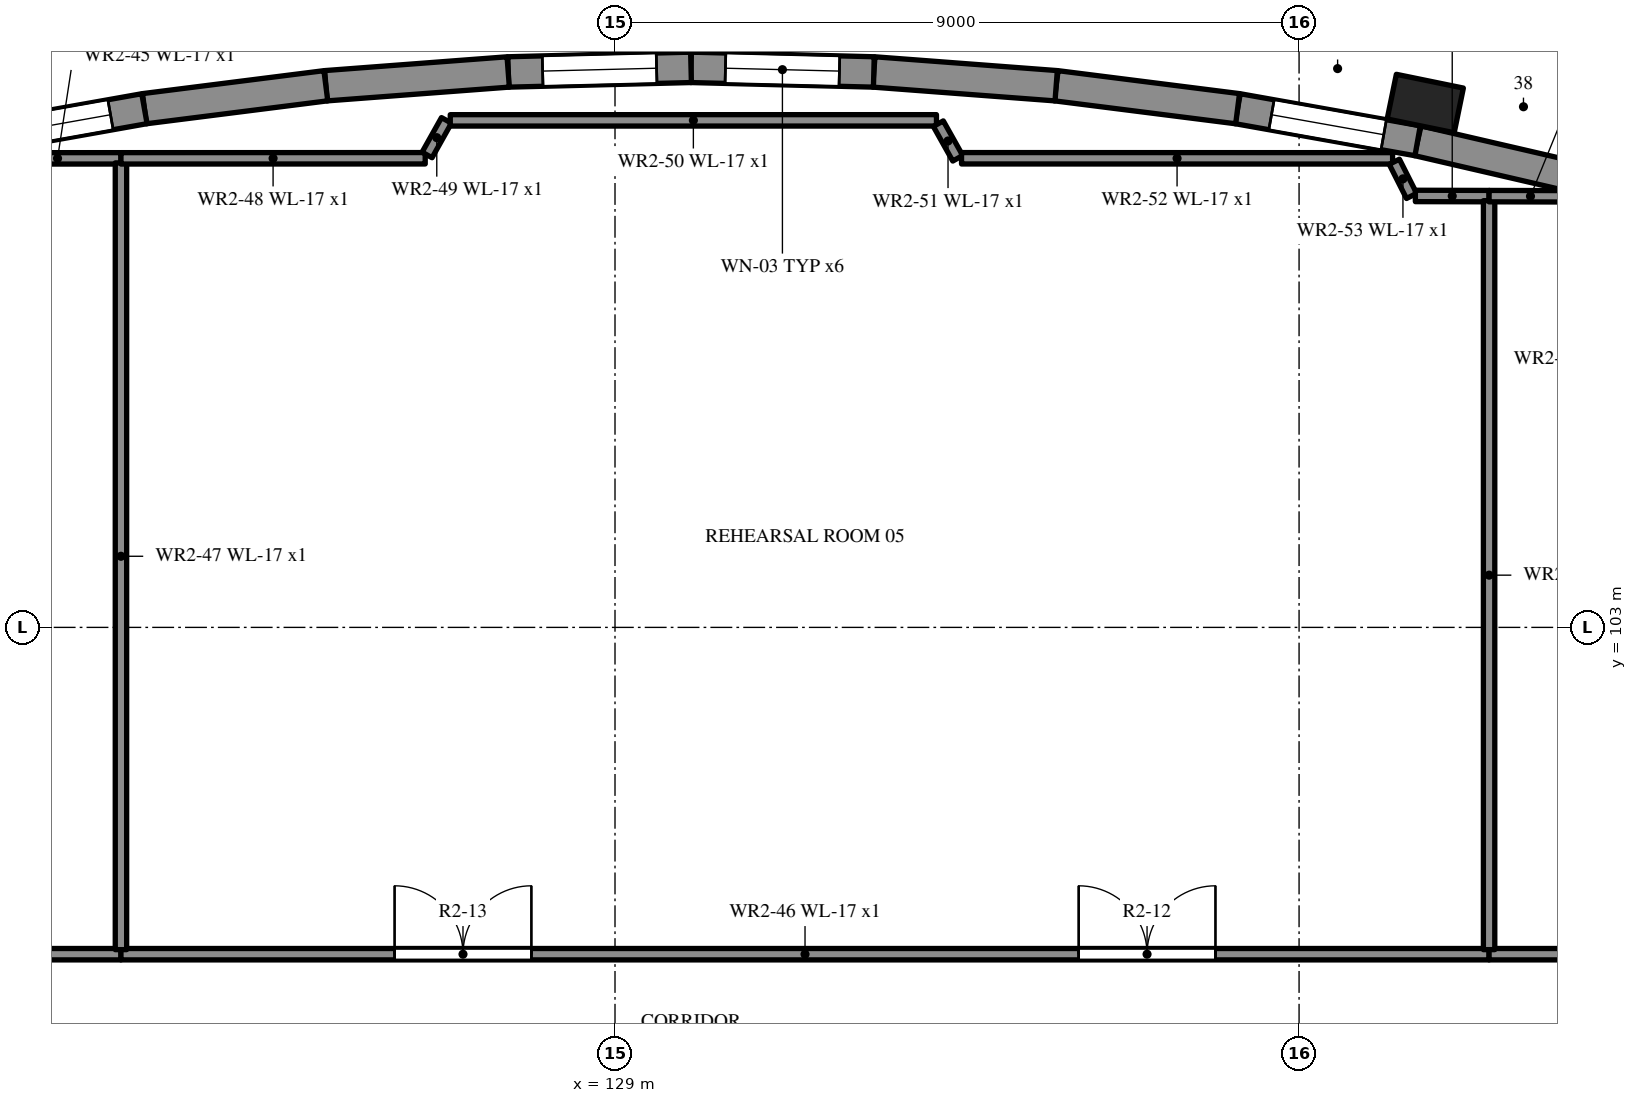
"""IFC4 building model, lengths in metres.
Left out: names, types, materials, properties, quantities, classifications, styles, units other than length and angle.
Written with IfcOpenShell. Run it as: python <this file> out.ifc"""

import sys

from ifc_helpers import new_model, si_unit, direction, frame, frame_2d, origin, origin_2d, place, context, subcontext, project, spatial, polyline, rectangle, outline, extrude, element, fill, save


model = new_model("IFC4")
c1 = context("Model", 3, precision=1e-05, world=origin(), true_north=direction((0.0, 1.0)))
c2 = subcontext(c1, "Body", "Model", "MODEL_VIEW")
j1 = project(units=[si_unit("LENGTHUNIT", "METRE"), si_unit("PLANEANGLEUNIT", "RADIAN")], contexts=[c1])
p1 = place(None, origin())
s1 = spatial("IfcSite", under=j1, at=p1, CompositionType="ELEMENT")
p2 = place(p1, origin())
s2 = spatial("IfcBuilding", under=s1, at=p2, CompositionType="ELEMENT")
p3 = place(p2, frame((0.0, 0.0, 10.2)))
s3 = spatial("IfcBuildingStorey", under=s2, at=p3, CompositionType="ELEMENT", Elevation=10.2)
p4 = place(p3, frame((142.006, 108.836, 0.0), z_axis=(0.0, 0.0, 1.0), x_axis=(-0.974189274843, 0.225732710925, 0.0)))
e1 = element("IfcWall", 1, at=p4, inside=s3, PredefinedType="SOLIDWALL", context=c2, shape_type="SweptSolid", body=[
    extrude(outline(polyline([(0.0, 0.0), (2.511, 0.0), (2.511, 3.813), (2.472, 3.799), (2.379, 3.766), (0.0, 2.911), (0.0, 0.0)])), frame((0.0, 0.2, 0.0), z_axis=(0.0, -1.0, 0.0), x_axis=(1.0, 0.0, 0.0)), (0.0, 0.0, 1.0), 0.4),
])
p5 = place(p3, frame((139.56, 109.403, 0.0), z_axis=(0.0, 0.0, 1.0), x_axis=(-0.984524011381, 0.175249738987, 0.0)))
e2 = element("IfcWall", 2, at=p5, inside=s3, PredefinedType="SOLIDWALL", context=c2, shape_type="SweptSolid", body=[
    extrude(outline(polyline([(0.0, 0.0), (2.406, 0.0), (2.406, 2.959), (2.328, 2.988), (0.085, 3.827), (0.0, 3.817), (0.0, 0.0)])), frame((0.0, 0.2, 0.0), z_axis=(0.0, -1.0, 0.0), x_axis=(1.0, 0.0, 0.0)), (0.0, 0.0, 1.0), 0.4),
])
p6 = place(p5, frame((0.453, 0.0, 0.9)))
e3 = element("IfcOpeningElement", 3, at=p6, cuts=e2, PredefinedType="OPENING", context=c2, shape_type="SweptSolid", body=[
    extrude(rectangle(XDim=1.5, YDim=1.2, at=frame_2d((0.75, 0.6))), frame((0.0, 0.21, 0.0), z_axis=(0.0, -1.0, 0.0), x_axis=(1.0, 0.0, 0.0)), (0.0, 0.0, 1.0), 0.42),
])
p7 = place(p3, frame((137.191, 109.825, 0.0), z_axis=(0.0, 0.0, 1.0), x_axis=(-0.99208939311, 0.125533406227, 0.0)))
e4 = element("IfcWall", 4, at=p7, inside=s3, PredefinedType="SOLIDWALL", context=c2, shape_type="SweptSolid", body=[
    extrude(outline(polyline([(0.0, 0.0), (2.406, 0.0), (2.406, 2.056), (2.298, 2.096), (0.066, 2.931), (0.0, 2.955), (0.0, 0.0)])), frame((0.0, 0.2, 0.0), z_axis=(0.0, -1.0, 0.0), x_axis=(1.0, 0.0, 0.0)), (0.0, 0.0, 1.0), 0.4),
])
p8 = place(p3, frame((134.804, 110.127, 0.0), z_axis=(0.0, 0.0, 1.0), x_axis=(-0.997153910364, 0.075392831525, 0.0)))
e5 = element("IfcWall", 5, at=p8, inside=s3, PredefinedType="SOLIDWALL", context=c2, shape_type="SweptSolid", body=[
    extrude(outline(polyline([(0.0, 0.0), (2.406, 0.0), (2.406, 2.955), (2.383, 2.947), (0.061, 2.077), (0.0, 2.054), (0.0, 0.0)])), frame((0.0, 0.2, 0.0), z_axis=(0.0, -1.0, 0.0), x_axis=(1.0, 0.0, 0.0)), (0.0, 0.0, 1.0), 0.4),
])
p9 = place(p3, frame((132.405, 110.308, 0.0), z_axis=(0.0, 0.0, 1.0), x_axis=(-0.999683321759, 0.025164582196, 0.0)))
e6 = element("IfcWall", 6, at=p9, inside=s3, PredefinedType="SOLIDWALL", context=c2, shape_type="SweptSolid", body=[
    extrude(outline(polyline([(0.0, 0.0), (2.406, 0.0), (2.406, 3.859), (2.333, 3.831), (0.0, 2.959), (0.0, 0.0)])), frame((0.0, 0.2, 0.0), z_axis=(0.0, -1.0, 0.0), x_axis=(1.0, 0.0, 0.0)), (0.0, 0.0, 1.0), 0.4),
])
p10 = place(p9, frame((0.453, 0.0, 0.9)))
e7 = element("IfcOpeningElement", 7, at=p10, cuts=e6, PredefinedType="OPENING", context=c2, shape_type="SweptSolid", body=[
    extrude(rectangle(XDim=1.5, YDim=1.2, at=frame_2d((0.75, 0.6))), frame((0.0, 0.21, 0.0), z_axis=(0.0, -1.0, 0.0), x_axis=(1.0, 0.0, 0.0)), (0.0, 0.0, 1.0), 0.42),
])
p11 = place(p3, frame((130.0, 110.369, 0.0), z_axis=(0.0, 0.0, 1.0), x_axis=(-0.999683321759, -0.025164582196, 0.0)))
e8 = element("IfcWall", 8, at=p11, inside=s3, PredefinedType="SOLIDWALL", context=c2, shape_type="SweptSolid", body=[
    extrude(outline(polyline([(0.0, 0.0), (2.406, 0.0), (2.406, 2.959), (2.373, 2.971), (0.063, 3.835), (0.0, 3.859), (0.0, 0.0)])), frame((0.0, 0.2, 0.0), z_axis=(0.0, -1.0, 0.0), x_axis=(1.0, 0.0, 0.0)), (0.0, 0.0, 1.0), 0.4),
])
p12 = place(p11, frame((0.453, 0.0, 0.9)))
e9 = element("IfcOpeningElement", 9, at=p12, cuts=e8, PredefinedType="OPENING", context=c2, shape_type="SweptSolid", body=[
    extrude(rectangle(XDim=1.5, YDim=1.2, at=frame_2d((0.75, 0.6))), frame((0.0, 0.21, 0.0), z_axis=(0.0, -1.0, 0.0), x_axis=(1.0, 0.0, 0.0)), (0.0, 0.0, 1.0), 0.42),
])
p13 = place(p3, frame((127.595, 110.308, 0.0), z_axis=(0.0, 0.0, 1.0), x_axis=(-0.997153910364, -0.075392831525, 0.0)))
e10 = element("IfcWall", 10, at=p13, inside=s3, PredefinedType="SOLIDWALL", context=c2, shape_type="SweptSolid", body=[
    extrude(outline(polyline([(0.0, 0.0), (2.406, 0.0), (2.406, 2.067), (2.396, 2.063), (2.345, 2.077), (0.0, 2.955), (0.0, 0.0)])), frame((0.0, 0.2, 0.0), z_axis=(0.0, -1.0, 0.0), x_axis=(1.0, 0.0, 0.0)), (0.0, 0.0, 1.0), 0.4),
])
p14 = place(p3, frame((125.196, 110.127, 0.0), z_axis=(0.0, 0.0, 1.0), x_axis=(-0.99208939311, -0.125533406227, 0.0)))
e11 = element("IfcWall", 11, at=p14, inside=s3, PredefinedType="SOLIDWALL", context=c2, shape_type="SweptSolid", body=[
    extrude(outline(polyline([(0.0, 0.0), (2.406, 0.0), (2.406, 2.969), (2.34, 2.946), (0.108, 2.111), (0.0, 2.07), (0.0, 0.0)])), frame((0.0, 0.2, 0.0), z_axis=(0.0, -1.0, 0.0), x_axis=(1.0, 0.0, 0.0)), (0.0, 0.0, 1.0), 0.4),
])
p15 = place(p3, frame((122.809, 109.825, 0.0), z_axis=(0.0, 0.0, 1.0), x_axis=(-0.984524011381, -0.175249738987, 0.0)))
e12 = element("IfcWall", 12, at=p15, inside=s3, PredefinedType="SOLIDWALL", context=c2, shape_type="SweptSolid", body=[
    extrude(outline(polyline([(0.0, 0.0), (2.406, 0.0), (2.406, 3.833), (2.357, 3.855), (2.285, 3.828), (0.078, 3.002), (0.0, 2.973), (0.0, 0.0)])), frame((0.0, 0.2, 0.0), z_axis=(0.0, -1.0, 0.0), x_axis=(1.0, 0.0, 0.0)), (0.0, 0.0, 1.0), 0.4),
])
p16 = place(p15, frame((0.453, 0.0, 0.9)))
e13 = element("IfcOpeningElement", 13, at=p16, cuts=e12, PredefinedType="OPENING", context=c2, shape_type="SweptSolid", body=[
    extrude(rectangle(XDim=1.5, YDim=1.2, at=frame_2d((0.75, 0.6))), frame((0.0, 0.21, 0.0), z_axis=(0.0, -1.0, 0.0), x_axis=(1.0, 0.0, 0.0)), (0.0, 0.0, 1.0), 0.42),
])
p17 = place(p3, frame((130.0, 110.869, 0.0), z_axis=(0.0, 0.0, 1.0), x_axis=(-1.0, 0.0, 0.0)))
e14 = element("IfcColumn", 14, at=p17, inside=s3, PredefinedType="PILASTER", context=c2, shape_type="SweptSolid", body=[
    extrude(rectangle(XDim=0.9, YDim=0.6, at=origin_2d()), origin(), (0.0, 0.0, 1.0), 3.381),
])
p18 = place(p3, frame((139.66, 109.893, 0.0), z_axis=(0.0, 0.0, 1.0), x_axis=(-0.979575047818, 0.201078904144, 0.0)))
e15 = element("IfcColumn", 15, at=p18, inside=s3, PredefinedType="PILASTER", context=c2, shape_type="SweptSolid", body=[
    extrude(rectangle(XDim=0.9, YDim=0.6, at=origin_2d()), origin(), (0.0, 0.0, 1.0), 3.247),
])
p19 = place(p3, frame((117.33, 98.7, 0.0), z_axis=(0.0, 0.0, 1.0), x_axis=(1.0, 0.0, 0.0)))
e16 = element("IfcWall", 16, at=p19, inside=s3, PredefinedType="PARTITIONING", context=c2, shape_type="SweptSolid", body=[
    extrude(rectangle(XDim=5.17, YDim=0.15, at=frame_2d((2.585, 0.0))), origin(), (0.0, 0.0, 1.0), 2.5),
])
p20 = place(p19, frame((2.07, 0.0, 0.0)))
e17 = element("IfcOpeningElement", 17, at=p20, cuts=e16, PredefinedType="OPENING", context=c2, shape_type="SweptSolid", body=[
    extrude(rectangle(XDim=1.0, YDim=2.1, at=frame_2d((0.5, 1.05))), frame((0.0, 0.085, 0.0), z_axis=(0.0, -1.0, 0.0), x_axis=(1.0, 0.0, 0.0)), (0.0, 0.0, 1.0), 0.17),
])
p21 = place(p3, frame((120.831, 109.171, 0.0), z_axis=(0.0, 0.0, 1.0), x_axis=(0.999999957189, 0.000292611546, 0.0)))
e18 = element("IfcWall", 18, at=p21, inside=s3, PredefinedType="PARTITIONING", context=c2, shape_type="SweptSolid", body=[
    extrude(rectangle(XDim=1.669, YDim=0.15, at=frame_2d((0.834, 0.0))), origin(), (0.0, 0.0, 1.0), 2.5),
])
p22 = place(p3, frame((122.5, 98.7, 0.0), z_axis=(0.0, 0.0, 1.0), x_axis=(1.0, 0.0, 0.0)))
e19 = element("IfcWall", 19, at=p22, inside=s3, PredefinedType="PARTITIONING", context=c2, shape_type="SweptSolid", body=[
    extrude(rectangle(XDim=18.0, YDim=0.15, at=frame_2d((9.0, 0.0))), origin(), (0.0, 0.0, 1.0), 2.5),
])
p23 = place(p22, frame((12.6, 0.0, 0.0)))
e20 = element("IfcOpeningElement", 20, at=p23, cuts=e19, PredefinedType="OPENING", context=c2, shape_type="SweptSolid", body=[
    extrude(rectangle(XDim=1.8, YDim=2.1, at=frame_2d((0.9, 1.05))), frame((0.0, 0.085, 0.0), z_axis=(0.0, -1.0, 0.0), x_axis=(1.0, 0.0, 0.0)), (0.0, 0.0, 1.0), 0.17),
])
p24 = place(p22, frame((3.6, 0.0, 0.0)))
e21 = element("IfcOpeningElement", 21, at=p24, cuts=e19, PredefinedType="OPENING", context=c2, shape_type="SweptSolid", body=[
    extrude(rectangle(XDim=1.8, YDim=2.1, at=frame_2d((0.9, 1.05))), frame((0.0, 0.085, 0.0), z_axis=(0.0, -1.0, 0.0), x_axis=(1.0, 0.0, 0.0)), (0.0, 0.0, 1.0), 0.17),
])
p25 = place(p3, frame((122.5, 109.112, 0.0), z_axis=(0.0, 0.0, 1.0), x_axis=(0.0, -1.0, 0.0)))
e22 = element("IfcWall", 22, at=p25, inside=s3, PredefinedType="PARTITIONING", context=c2, shape_type="SweptSolid", body=[
    extrude(rectangle(XDim=10.352, YDim=0.15, at=frame_2d((5.176, 0.0))), origin(), (0.0, 0.0, 1.0), 2.5),
])
p26 = place(p3, frame((122.5, 109.172, 0.0), z_axis=(0.0, 0.0, 1.0), x_axis=(0.999999970241, 0.000243961935, 0.0)))
e23 = element("IfcWall", 23, at=p26, inside=s3, PredefinedType="PARTITIONING", context=c2, shape_type="SweptSolid", body=[
    extrude(rectangle(XDim=4.003, YDim=0.15, at=frame_2d((2.001, 0.0))), origin(), (0.0, 0.0, 1.0), 2.5),
])
p27 = place(p3, frame((126.528, 109.216, 0.0), z_axis=(0.0, 0.0, 1.0), x_axis=(0.489016553908, 0.872274503814, 0.0)))
e24 = element("IfcWall", 24, at=p27, inside=s3, PredefinedType="PARTITIONING", context=c2, shape_type="SweptSolid", body=[
    extrude(rectangle(XDim=0.522, YDim=0.15, at=frame_2d((0.261, 0.0))), origin(), (0.0, 0.0, 1.0), 2.5),
])
p28 = place(p3, frame((126.833, 109.671, 0.0), z_axis=(0.0, 0.0, 1.0), x_axis=(0.999999999272, 3.8165026e-05, 0.0)))
e25 = element("IfcWall", 25, at=p28, inside=s3, PredefinedType="PARTITIONING", context=c2, shape_type="SweptSolid", body=[
    extrude(rectangle(XDim=6.397, YDim=0.15, at=frame_2d((3.198, 0.0))), origin(), (0.0, 0.0, 1.0), 2.5),
])
p29 = place(p3, frame((133.254, 109.628, 0.0), z_axis=(0.0, 0.0, 1.0), x_axis=(0.489016553908, -0.872274503814, 0.0)))
e26 = element("IfcWall", 26, at=p29, inside=s3, PredefinedType="PARTITIONING", context=c2, shape_type="SweptSolid", body=[
    extrude(rectangle(XDim=0.522, YDim=0.15, at=frame_2d((0.261, 0.0))), origin(), (0.0, 0.0, 1.0), 2.5),
])
p30 = place(p3, frame((133.559, 109.173, 0.0), z_axis=(0.0, 0.0, 1.0), x_axis=(0.999999976836, -0.00021523891, 0.0)))
e27 = element("IfcWall", 27, at=p30, inside=s3, PredefinedType="PARTITIONING", context=c2, shape_type="SweptSolid", body=[
    extrude(rectangle(XDim=5.671, YDim=0.15, at=frame_2d((2.836, 0.0))), origin(), (0.0, 0.0, 1.0), 2.5),
])
p31 = place(p3, frame((139.253, 109.127, 0.0), z_axis=(0.0, 0.0, 1.0), x_axis=(0.450699478725, -0.892675741732, 0.0)))
e28 = element("IfcWall", 28, at=p31, inside=s3, PredefinedType="PARTITIONING", context=c2, shape_type="SweptSolid", body=[
    extrude(rectangle(XDim=0.504, YDim=0.15, at=frame_2d((0.252, 0.0))), origin(), (0.0, 0.0, 1.0), 2.5),
])
p32 = place(p3, frame((139.53, 108.677, 0.0), z_axis=(0.0, 0.0, 1.0), x_axis=(0.999996832397, -0.002516981708, 0.0)))
e29 = element("IfcWall", 29, at=p32, inside=s3, PredefinedType="PARTITIONING", context=c2, shape_type="SweptSolid", body=[
    extrude(rectangle(XDim=0.97, YDim=0.15, at=frame_2d((0.485, 0.0))), origin(), (0.0, 0.0, 1.0), 2.5),
])
p33 = place(p3, frame((140.5, 98.7, 0.0), z_axis=(0.0, 0.0, 1.0), x_axis=(1.0, 0.0, 0.0)))
e30 = element("IfcWall", 30, at=p33, inside=s3, PredefinedType="PARTITIONING", context=c2, shape_type="SweptSolid", body=[
    extrude(rectangle(XDim=9.57, YDim=0.15, at=frame_2d((4.785, 0.0))), origin(), (0.0, 0.0, 1.0), 2.5),
])
p34 = place(p33, frame((4.3, 0.0, 0.0)))
e31 = element("IfcOpeningElement", 31, at=p34, cuts=e30, PredefinedType="OPENING", context=c2, shape_type="SweptSolid", body=[
    extrude(rectangle(XDim=1.0, YDim=2.1, at=frame_2d((0.5, 1.05))), frame((0.0, 0.085, 0.0), z_axis=(0.0, -1.0, 0.0), x_axis=(1.0, 0.0, 0.0)), (0.0, 0.0, 1.0), 0.17),
])
p35 = place(p3, frame((140.5, 108.615, 0.0), z_axis=(0.0, 0.0, 1.0), x_axis=(0.0, -1.0, 0.0)))
e32 = element("IfcWall", 32, at=p35, inside=s3, PredefinedType="PARTITIONING", context=c2, shape_type="SweptSolid", body=[
    extrude(rectangle(XDim=9.854, YDim=0.15, at=frame_2d((4.927, 0.0))), origin(), (0.0, 0.0, 1.0), 2.5),
])
p36 = place(p3, frame((140.5, 108.674, 0.0), z_axis=(0.0, 0.0, 1.0), x_axis=(0.999996961255, -0.002465254723, 0.0)))
e33 = element("IfcWall", 33, at=p36, inside=s3, PredefinedType="PARTITIONING", context=c2, shape_type="SweptSolid", body=[
    extrude(rectangle(XDim=1.089, YDim=0.15, at=frame_2d((0.545, 0.0))), origin(), (0.0, 0.0, 1.0), 2.5),
])
p37 = place(p6, origin())
e34 = element("IfcWindow", 34, at=p37, inside=s3, PartitioningType="SINGLE_PANEL", PredefinedType="WINDOW", context=c2, shape_type="SweptSolid", body=[
    extrude(rectangle(XDim=1.5, YDim=1.2, at=frame_2d((0.75, 0.6))), frame((0.0, 0.03, 0.0), z_axis=(0.0, -1.0, 0.0), x_axis=(1.0, 0.0, 0.0)), (0.0, 0.0, 1.0), 0.06),
])
fill(e3, e34)
p38 = place(p10, origin())
e35 = element("IfcWindow", 35, at=p38, inside=s3, PartitioningType="SINGLE_PANEL", PredefinedType="WINDOW", context=c2, shape_type="SweptSolid", body=[
    extrude(rectangle(XDim=1.5, YDim=1.2, at=frame_2d((0.75, 0.6))), frame((0.0, 0.03, 0.0), z_axis=(0.0, -1.0, 0.0), x_axis=(1.0, 0.0, 0.0)), (0.0, 0.0, 1.0), 0.06),
])
fill(e7, e35)
p39 = place(p12, origin())
e36 = element("IfcWindow", 36, at=p39, inside=s3, PartitioningType="SINGLE_PANEL", PredefinedType="WINDOW", context=c2, shape_type="SweptSolid", body=[
    extrude(rectangle(XDim=1.5, YDim=1.2, at=frame_2d((0.75, 0.6))), frame((0.0, 0.03, 0.0), z_axis=(0.0, -1.0, 0.0), x_axis=(1.0, 0.0, 0.0)), (0.0, 0.0, 1.0), 0.06),
])
fill(e9, e36)
p40 = place(p16, origin())
e37 = element("IfcWindow", 37, at=p40, inside=s3, PartitioningType="SINGLE_PANEL", PredefinedType="WINDOW", context=c2, shape_type="SweptSolid", body=[
    extrude(rectangle(XDim=1.5, YDim=1.2, at=frame_2d((0.75, 0.6))), frame((0.0, 0.03, 0.0), z_axis=(0.0, -1.0, 0.0), x_axis=(1.0, 0.0, 0.0)), (0.0, 0.0, 1.0), 0.06),
])
fill(e13, e37)
p41 = place(p23, origin())
e38 = element("IfcDoor", 38, at=p41, inside=s3, OperationType="DOUBLE_DOOR_SINGLE_SWING", PredefinedType="DOOR", context=c2, shape_type="SweptSolid", body=[
    extrude(rectangle(XDim=1.8, YDim=2.1, at=frame_2d((0.9, 1.05))), frame((0.0, 0.025, 0.0), z_axis=(0.0, -1.0, 0.0), x_axis=(1.0, 0.0, 0.0)), (0.0, 0.0, 1.0), 0.05),
])
fill(e20, e38)
p42 = place(p24, origin())
e39 = element("IfcDoor", 39, at=p42, inside=s3, OperationType="DOUBLE_DOOR_SINGLE_SWING", PredefinedType="DOOR", context=c2, shape_type="SweptSolid", body=[
    extrude(rectangle(XDim=1.8, YDim=2.1, at=frame_2d((0.9, 1.05))), frame((0.0, 0.025, 0.0), z_axis=(0.0, -1.0, 0.0), x_axis=(1.0, 0.0, 0.0)), (0.0, 0.0, 1.0), 0.05),
])
fill(e21, e39)
save(model, sys.argv[1])
